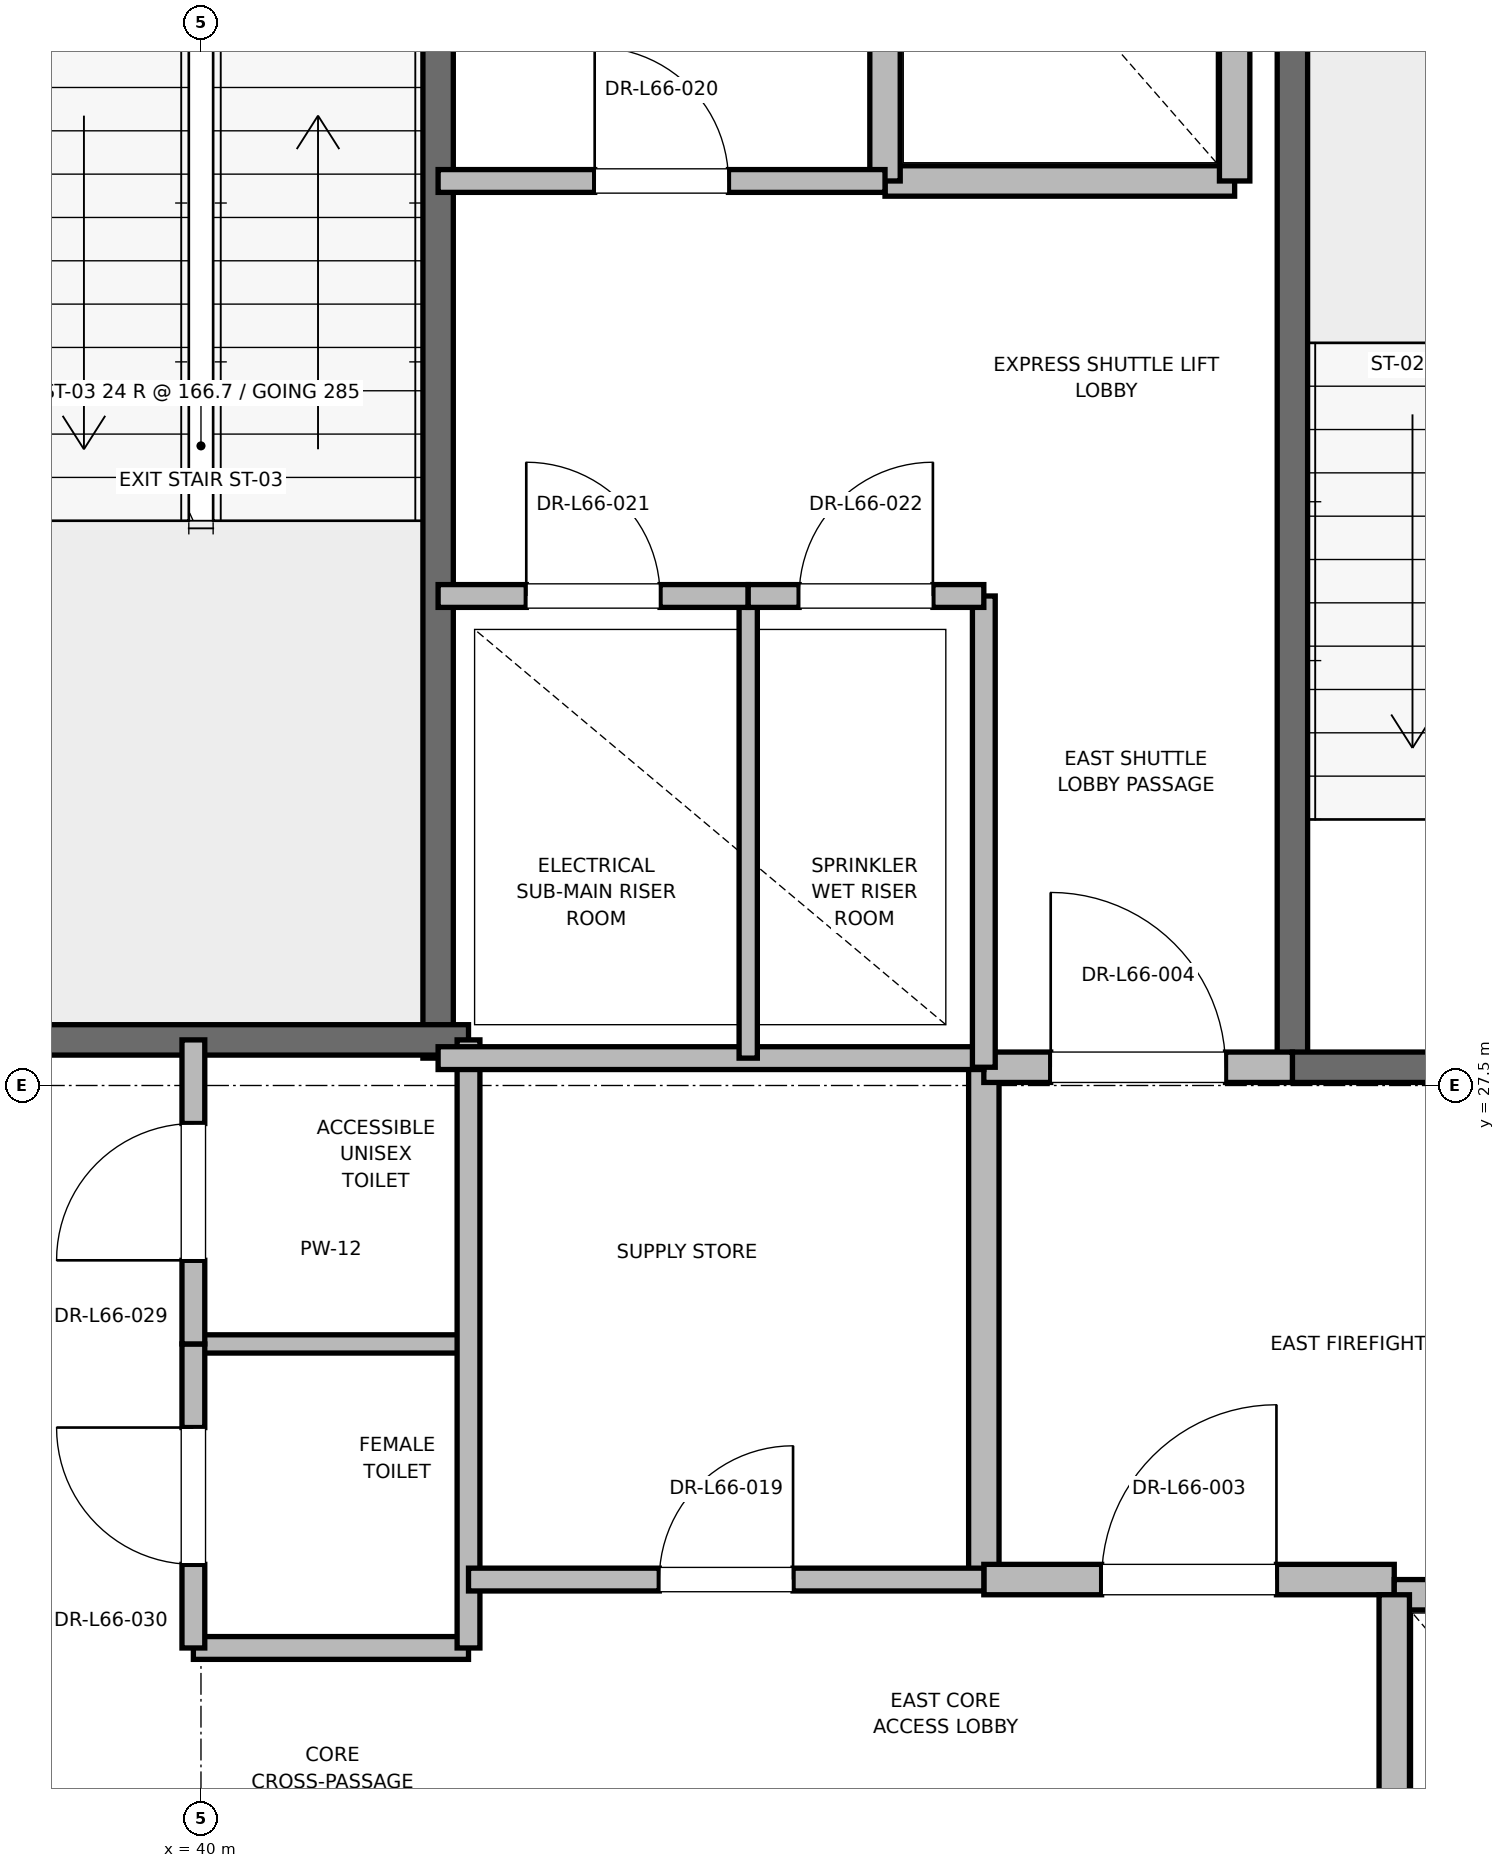
"""IFC4 building model, lengths in metres.
Left out: names, types, materials, properties, quantities, classifications, styles, units other than length and angle.
Written with IfcOpenShell. Run it as: python <this file> out.ifc"""

import sys

from ifc_helpers import new_model, si_unit, direction, frame, frame_2d, origin, place, context, subcontext, project, spatial, rectangle, extrude, element, fill, save


model = new_model("IFC4")
c1 = context("Model", 3, precision=1e-05, world=origin(), true_north=direction((0.0, 1.0)))
c2 = subcontext(c1, "Body", "Model", "MODEL_VIEW")
j1 = project(units=[si_unit("LENGTHUNIT", "METRE"), si_unit("PLANEANGLEUNIT", "RADIAN")], contexts=[c1])
p1 = place(None, origin())
s1 = spatial("IfcSite", under=j1, at=p1, CompositionType="ELEMENT")
p2 = place(p1, origin())
s2 = spatial("IfcBuilding", under=s1, at=p2, CompositionType="ELEMENT")
p3 = place(p2, frame((0.0, 0.0, 283.2)))
s3 = spatial("IfcBuildingStorey", under=s2, at=p3, CompositionType="ELEMENT", Elevation=283.2)
p4 = place(p3, frame((47.18, 27.62, 0.0), z_axis=(0.0, 0.0, 1.0), x_axis=(0.0, 1.0, 0.0)))
e1 = element("IfcWall", 1, at=p4, inside=s3, PredefinedType="SOLIDWALL", context=c2, shape_type="SweptSolid", body=[
    extrude(rectangle(XDim=8.18, YDim=0.2, at=frame_2d((4.09, 0.0))), origin(), (0.0, 0.0, 1.0), 3.785),
])
p5 = place(p3, frame((47.18, 27.62, 0.0), z_axis=(0.0, 0.0, 1.0), x_axis=(1.0, 0.0, 0.0)))
e2 = element("IfcWall", 2, at=p5, inside=s3, PredefinedType="SOLIDWALL", context=c2, shape_type="SweptSolid", body=[
    extrude(rectangle(XDim=3.12, YDim=0.2, at=frame_2d((1.56, 0.0))), origin(), (0.0, 0.0, 1.0), 3.785),
])
p6 = place(p5, frame((1.01, 0.0, 0.0)))
e3 = element("IfcOpeningElement", 3, at=p6, cuts=e2, PredefinedType="OPENING", context=c2, shape_type="SweptSolid", body=[
    extrude(rectangle(XDim=1.1, YDim=2.15, at=frame_2d((0.55, 1.075))), frame((0.0, 0.1, 0.0), z_axis=(0.0, -1.0, 0.0), x_axis=(1.0, 0.0, 0.0)), (0.0, 0.0, 1.0), 0.2),
])
p7 = place(p3, frame((41.56, 27.68, 0.0), z_axis=(0.0, 0.0, 1.0), x_axis=(0.0, 1.0, 0.0)))
e4 = element("IfcWall", 4, at=p7, inside=s3, PredefinedType="SOLIDWALL", context=c2, shape_type="SweptSolid", body=[
    extrude(rectangle(XDim=8.57, YDim=0.2, at=frame_2d((4.285, 0.0))), origin(), (0.0, 0.0, 1.0), 3.785),
])
p8 = place(p3, frame((38.44, 27.8, 0.0), z_axis=(0.0, 0.0, 1.0), x_axis=(1.0, 0.0, 0.0)))
e5 = element("IfcWall", 5, at=p8, inside=s3, PredefinedType="SOLIDWALL", context=c2, shape_type="SweptSolid", body=[
    extrude(rectangle(XDim=3.32, YDim=0.2, at=frame_2d((1.66, 0.0))), origin(), (0.0, 0.0, 1.0), 3.785),
])
p9 = place(p3, frame((45.15, 24.25, 0.0), z_axis=(0.0, 0.0, 1.0), x_axis=(0.0, 1.0, 0.0)))
e6 = element("IfcWall", 6, at=p9, inside=s3, PredefinedType="PARTITIONING", context=c2, shape_type="SweptSolid", body=[
    extrude(rectangle(XDim=3.37, YDim=0.2, at=frame_2d((1.685, 0.0))), origin(), (0.0, 0.0, 1.0), 3.785),
])
p10 = place(p3, frame((45.15, 24.25, 0.0), z_axis=(0.0, 0.0, 1.0), x_axis=(1.0, 0.0, 0.0)))
e7 = element("IfcWall", 7, at=p10, inside=s3, PredefinedType="PARTITIONING", context=c2, shape_type="SweptSolid", body=[
    extrude(rectangle(XDim=2.7, YDim=0.2, at=frame_2d((1.35, 0.0))), origin(), (0.0, 0.0, 1.0), 3.785),
])
p11 = place(p10, frame((0.775, 0.0, 0.0)))
e8 = element("IfcOpeningElement", 8, at=p11, cuts=e7, PredefinedType="OPENING", context=c2, shape_type="SweptSolid", body=[
    extrude(rectangle(XDim=1.15, YDim=2.2, at=frame_2d((0.575, 1.1))), frame((0.0, 0.1, 0.0), z_axis=(0.0, -1.0, 0.0), x_axis=(1.0, 0.0, 0.0)), (0.0, 0.0, 1.0), 0.2),
])
p12 = place(p3, frame((45.15, 27.62, 0.0), z_axis=(0.0, 0.0, 1.0), x_axis=(1.0, 0.0, 0.0)))
e9 = element("IfcWall", 9, at=p12, inside=s3, PredefinedType="PARTITIONING", context=c2, shape_type="SweptSolid", body=[
    extrude(rectangle(XDim=2.03, YDim=0.2, at=frame_2d((1.015, 0.0))), origin(), (0.0, 0.0, 1.0), 3.785),
])
p13 = place(p12, frame((0.44, 0.0, 0.0)))
e10 = element("IfcOpeningElement", 10, at=p13, cuts=e9, PredefinedType="OPENING", context=c2, shape_type="SweptSolid", body=[
    extrude(rectangle(XDim=1.15, YDim=2.2, at=frame_2d((0.575, 1.1))), frame((0.0, 0.1, 0.0), z_axis=(0.0, -1.0, 0.0), x_axis=(1.0, 0.0, 0.0)), (0.0, 0.0, 1.0), 0.2),
])
p14 = place(p3, frame((50.45, 24.15, 0.0), z_axis=(0.0, 0.0, 1.0), x_axis=(-1.0, 0.0, 0.0)))
e11 = element("IfcWall", 11, at=p14, inside=s3, PredefinedType="SOLIDWALL", context=c2, shape_type="SweptSolid", body=[
    extrude(rectangle(XDim=2.6, YDim=0.2, at=frame_2d((1.3, 0.0))), origin(), (0.0, 0.0, 1.0), 2.865),
])
p15 = place(p14, frame((0.75, 0.0, 0.0)))
e12 = element("IfcOpeningElement", 12, at=p15, cuts=e11, PredefinedType="OPENING", context=c2, shape_type="SweptSolid", body=[
    extrude(rectangle(XDim=1.1, YDim=2.2, at=frame_2d((0.55, 1.1))), frame((0.0, 0.1, 0.0), z_axis=(0.0, -1.0, 0.0), x_axis=(1.0, 0.0, 0.0)), (0.0, 0.0, 1.0), 0.2),
])
p16 = place(p3, frame((47.85, 24.15, 0.0), z_axis=(0.0, 0.0, 1.0), x_axis=(0.0, -1.0, 0.0)))
e13 = element("IfcWall", 13, at=p16, inside=s3, PredefinedType="SOLIDWALL", context=c2, shape_type="SweptSolid", body=[
    extrude(rectangle(XDim=3.0, YDim=0.2, at=frame_2d((1.5, 0.0))), origin(), (0.0, 0.0, 1.0), 3.785),
])
p17 = place(p3, frame((44.5, 33.45, 0.0), z_axis=(0.0, 0.0, 1.0), x_axis=(1.0, 0.0, 0.0)))
e14 = element("IfcWall", 14, at=p17, inside=s3, PredefinedType="SOLIDWALL", context=c2, shape_type="SweptSolid", body=[
    extrude(rectangle(XDim=2.3, YDim=0.2, at=frame_2d((1.15, 0.0))), origin(), (0.0, 0.0, 1.0), 3.785),
])
p18 = place(p3, frame((44.5, 36.05, 0.0), z_axis=(0.0, 0.0, 1.0), x_axis=(0.0, -1.0, 0.0)))
e15 = element("IfcWall", 15, at=p18, inside=s3, PredefinedType="SOLIDWALL", context=c2, shape_type="SweptSolid", body=[
    extrude(rectangle(XDim=2.6, YDim=0.2, at=frame_2d((1.3, 0.0))), origin(), (0.0, 0.0, 1.0), 2.865),
])
p19 = place(p3, frame((46.8, 33.45, 0.0), z_axis=(0.0, 0.0, 1.0), x_axis=(0.0, 1.0, 0.0)))
e16 = element("IfcWall", 16, at=p19, inside=s3, PredefinedType="SOLIDWALL", context=c2, shape_type="SweptSolid", body=[
    extrude(rectangle(XDim=2.6, YDim=0.2, at=frame_2d((1.3, 0.0))), origin(), (0.0, 0.0, 1.0), 3.785),
])
p20 = place(p3, frame((39.95, 23.8, 0.0), z_axis=(0.0, 0.0, 1.0), x_axis=(1.0, 0.0, 0.0)))
e17 = element("IfcWall", 17, at=p20, inside=s3, PredefinedType="PARTITIONING", context=c2, shape_type="SweptSolid", body=[
    extrude(rectangle(XDim=1.81, YDim=0.15, at=frame_2d((0.905, 0.0))), origin(), (0.0, 0.0, 1.0), 2.85),
])
p21 = place(p3, frame((39.95, 25.8, 0.0), z_axis=(0.0, 0.0, 1.0), x_axis=(1.0, 0.0, 0.0)))
e18 = element("IfcWall", 18, at=p21, inside=s3, PredefinedType="PARTITIONING", context=c2, shape_type="SweptSolid", body=[
    extrude(rectangle(XDim=1.81, YDim=0.12, at=frame_2d((0.905, 0.0))), origin(), (0.0, 0.0, 1.0), 2.85),
])
p22 = place(p3, frame((41.76, 23.8, 0.0), z_axis=(0.0, 0.0, 1.0), x_axis=(0.0, 1.0, 0.0)))
e19 = element("IfcWall", 19, at=p22, inside=s3, PredefinedType="PARTITIONING", context=c2, shape_type="SweptSolid", body=[
    extrude(rectangle(XDim=4.0, YDim=0.15, at=frame_2d((2.0, 0.0))), origin(), (0.0, 0.0, 1.0), 2.85),
])
p23 = place(p3, frame((39.95, 23.8, 0.0), z_axis=(0.0, 0.0, 1.0), x_axis=(0.0, 1.0, 0.0)))
e20 = element("IfcWall", 20, at=p23, inside=s3, PredefinedType="PARTITIONING", context=c2, shape_type="SweptSolid", body=[
    extrude(rectangle(XDim=2.0, YDim=0.15, at=frame_2d((1.0, 0.0))), origin(), (0.0, 0.0, 1.0), 2.85),
])
p24 = place(p23, frame((0.55, 0.0, 0.0)))
e21 = element("IfcOpeningElement", 21, at=p24, cuts=e20, PredefinedType="OPENING", context=c2, shape_type="SweptSolid", body=[
    extrude(rectangle(XDim=0.9, YDim=2.1, at=frame_2d((0.45, 1.05))), frame((0.0, 0.075, 0.0), z_axis=(0.0, -1.0, 0.0), x_axis=(1.0, 0.0, 0.0)), (0.0, 0.0, 1.0), 0.15),
])
p25 = place(p3, frame((39.95, 25.8, 0.0), z_axis=(0.0, 0.0, 1.0), x_axis=(0.0, 1.0, 0.0)))
e22 = element("IfcWall", 22, at=p25, inside=s3, PredefinedType="PARTITIONING", context=c2, shape_type="SweptSolid", body=[
    extrude(rectangle(XDim=2.0, YDim=0.15, at=frame_2d((1.0, 0.0))), origin(), (0.0, 0.0, 1.0), 2.85),
])
p26 = place(p25, frame((0.55, 0.0, 0.0)))
e23 = element("IfcOpeningElement", 23, at=p26, cuts=e22, PredefinedType="OPENING", context=c2, shape_type="SweptSolid", body=[
    extrude(rectangle(XDim=0.9, YDim=2.1, at=frame_2d((0.45, 1.05))), frame((0.0, 0.075, 0.0), z_axis=(0.0, -1.0, 0.0), x_axis=(1.0, 0.0, 0.0)), (0.0, 0.0, 1.0), 0.15),
])
p27 = place(p3, frame((41.56, 27.68, 0.0), z_axis=(0.0, 0.0, 1.0), x_axis=(1.0, 0.0, 0.0)))
e24 = element("IfcWall", 24, at=p27, inside=s3, PredefinedType="PARTITIONING", context=c2, shape_type="SweptSolid", body=[
    extrude(rectangle(XDim=3.59, YDim=0.15, at=frame_2d((1.795, 0.0))), origin(), (0.0, 0.0, 1.0), 2.85),
])
p28 = place(p3, frame((41.76, 24.25, 0.0), z_axis=(0.0, 0.0, 1.0), x_axis=(1.0, 0.0, 0.0)))
e25 = element("IfcWall", 25, at=p28, inside=s3, PredefinedType="PARTITIONING", context=c2, shape_type="SweptSolid", body=[
    extrude(rectangle(XDim=3.39, YDim=0.15, at=frame_2d((1.695, 0.0))), origin(), (0.0, 0.0, 1.0), 2.85),
])
p29 = place(p28, frame((1.255, 0.0, 0.0)))
e26 = element("IfcOpeningElement", 26, at=p29, cuts=e25, PredefinedType="OPENING", context=c2, shape_type="SweptSolid", body=[
    extrude(rectangle(XDim=0.88, YDim=2.1, at=frame_2d((0.44, 1.05))), frame((0.0, 0.075, 0.0), z_axis=(0.0, -1.0, 0.0), x_axis=(1.0, 0.0, 0.0)), (0.0, 0.0, 1.0), 0.15),
])
p30 = place(p3, frame((45.15, 27.62, 0.0), z_axis=(0.0, 0.0, 1.0), x_axis=(0.0, 1.0, 0.0)))
e27 = element("IfcWall", 27, at=p30, inside=s3, PredefinedType="PARTITIONING", context=c2, shape_type="SweptSolid", body=[
    extrude(rectangle(XDim=3.1, YDim=0.15, at=frame_2d((1.55, 0.0))), origin(), (0.0, 0.0, 1.0), 2.85),
])
p31 = place(p3, frame((43.6, 27.68, 0.0), z_axis=(0.0, 0.0, 1.0), x_axis=(0.0, 1.0, 0.0)))
e28 = element("IfcWall", 28, at=p31, inside=s3, PredefinedType="PARTITIONING", context=c2, shape_type="SweptSolid", body=[
    extrude(rectangle(XDim=3.04, YDim=0.12, at=frame_2d((1.52, 0.0))), origin(), (0.0, 0.0, 1.0), 2.85),
])
p32 = place(p3, frame((41.56, 30.72, 0.0), z_axis=(0.0, 0.0, 1.0), x_axis=(1.0, 0.0, 0.0)))
e29 = element("IfcWall", 29, at=p32, inside=s3, PredefinedType="PARTITIONING", context=c2, shape_type="SweptSolid", body=[
    extrude(rectangle(XDim=2.04, YDim=0.15, at=frame_2d((1.02, 0.0))), origin(), (0.0, 0.0, 1.0), 2.85),
])
p33 = place(p32, frame((0.58, 0.0, 0.0)))
e30 = element("IfcOpeningElement", 30, at=p33, cuts=e29, PredefinedType="OPENING", context=c2, shape_type="SweptSolid", body=[
    extrude(rectangle(XDim=0.88, YDim=2.1, at=frame_2d((0.44, 1.05))), frame((0.0, 0.075, 0.0), z_axis=(0.0, -1.0, 0.0), x_axis=(1.0, 0.0, 0.0)), (0.0, 0.0, 1.0), 0.15),
])
p34 = place(p3, frame((43.6, 30.72, 0.0), z_axis=(0.0, 0.0, 1.0), x_axis=(1.0, 0.0, 0.0)))
e31 = element("IfcWall", 31, at=p34, inside=s3, PredefinedType="PARTITIONING", context=c2, shape_type="SweptSolid", body=[
    extrude(rectangle(XDim=1.55, YDim=0.15, at=frame_2d((0.775, 0.0))), origin(), (0.0, 0.0, 1.0), 2.85),
])
p35 = place(p34, frame((0.335, 0.0, 0.0)))
e32 = element("IfcOpeningElement", 32, at=p35, cuts=e31, PredefinedType="OPENING", context=c2, shape_type="SweptSolid", body=[
    extrude(rectangle(XDim=0.88, YDim=2.1, at=frame_2d((0.44, 1.05))), frame((0.0, 0.075, 0.0), z_axis=(0.0, -1.0, 0.0), x_axis=(1.0, 0.0, 0.0)), (0.0, 0.0, 1.0), 0.15),
])
p36 = place(p3, frame((41.56, 33.45, 0.0), z_axis=(0.0, 0.0, 1.0), x_axis=(1.0, 0.0, 0.0)))
e33 = element("IfcWall", 33, at=p36, inside=s3, PredefinedType="PARTITIONING", context=c2, shape_type="SweptSolid", body=[
    extrude(rectangle(XDim=2.94, YDim=0.15, at=frame_2d((1.47, 0.0))), origin(), (0.0, 0.0, 1.0), 2.85),
])
p37 = place(p36, frame((1.03, 0.0, 0.0)))
e34 = element("IfcOpeningElement", 34, at=p37, cuts=e33, PredefinedType="OPENING", context=c2, shape_type="SweptSolid", body=[
    extrude(rectangle(XDim=0.88, YDim=2.1, at=frame_2d((0.44, 1.05))), frame((0.0, 0.075, 0.0), z_axis=(0.0, -1.0, 0.0), x_axis=(1.0, 0.0, 0.0)), (0.0, 0.0, 1.0), 0.15),
])
p38 = place(p11, origin())
e35 = element("IfcDoor", 35, at=p38, inside=s3, OperationType="SINGLE_SWING_RIGHT", PredefinedType="DOOR", context=c2, shape_type="SweptSolid", body=[
    extrude(rectangle(XDim=1.15, YDim=2.2, at=frame_2d((0.575, 1.1))), frame((0.0, 0.025, 0.0), z_axis=(0.0, -1.0, 0.0), x_axis=(1.0, 0.0, 0.0)), (0.0, 0.0, 1.0), 0.05),
])
fill(e8, e35)
p39 = place(p13, origin())
e36 = element("IfcDoor", 36, at=p39, inside=s3, OperationType="SINGLE_SWING_LEFT", PredefinedType="DOOR", context=c2, shape_type="SweptSolid", body=[
    extrude(rectangle(XDim=1.15, YDim=2.2, at=frame_2d((0.575, 1.1))), frame((0.0, 0.025, 0.0), z_axis=(0.0, -1.0, 0.0), x_axis=(1.0, 0.0, 0.0)), (0.0, 0.0, 1.0), 0.05),
])
fill(e10, e36)
p40 = place(p24, origin())
e37 = element("IfcDoor", 37, at=p40, inside=s3, OperationType="SINGLE_SWING_RIGHT", PredefinedType="DOOR", context=c2, shape_type="SweptSolid", body=[
    extrude(rectangle(XDim=0.9, YDim=2.1, at=frame_2d((0.45, 1.05))), frame((0.0, 0.025, 0.0), z_axis=(0.0, -1.0, 0.0), x_axis=(1.0, 0.0, 0.0)), (0.0, 0.0, 1.0), 0.05),
])
fill(e21, e37)
p41 = place(p26, origin())
e38 = element("IfcDoor", 38, at=p41, inside=s3, OperationType="SINGLE_SWING_LEFT", PredefinedType="DOOR", context=c2, shape_type="SweptSolid", body=[
    extrude(rectangle(XDim=0.9, YDim=2.1, at=frame_2d((0.45, 1.05))), frame((0.0, 0.025, 0.0), z_axis=(0.0, -1.0, 0.0), x_axis=(1.0, 0.0, 0.0)), (0.0, 0.0, 1.0), 0.05),
])
fill(e23, e38)
p42 = place(p29, origin())
e39 = element("IfcDoor", 39, at=p42, inside=s3, OperationType="SINGLE_SWING_RIGHT", PredefinedType="DOOR", context=c2, shape_type="SweptSolid", body=[
    extrude(rectangle(XDim=0.88, YDim=2.1, at=frame_2d((0.44, 1.05))), frame((0.0, 0.025, 0.0), z_axis=(0.0, -1.0, 0.0), x_axis=(1.0, 0.0, 0.0)), (0.0, 0.0, 1.0), 0.05),
])
fill(e26, e39)
p43 = place(p33, origin())
e40 = element("IfcDoor", 40, at=p43, inside=s3, OperationType="SINGLE_SWING_LEFT", PredefinedType="DOOR", context=c2, shape_type="SweptSolid", body=[
    extrude(rectangle(XDim=0.88, YDim=2.1, at=frame_2d((0.44, 1.05))), frame((0.0, 0.025, 0.0), z_axis=(0.0, -1.0, 0.0), x_axis=(1.0, 0.0, 0.0)), (0.0, 0.0, 1.0), 0.05),
])
fill(e30, e40)
p44 = place(p35, origin())
e41 = element("IfcDoor", 41, at=p44, inside=s3, OperationType="SINGLE_SWING_RIGHT", PredefinedType="DOOR", context=c2, shape_type="SweptSolid", body=[
    extrude(rectangle(XDim=0.88, YDim=2.1, at=frame_2d((0.44, 1.05))), frame((0.0, 0.025, 0.0), z_axis=(0.0, -1.0, 0.0), x_axis=(1.0, 0.0, 0.0)), (0.0, 0.0, 1.0), 0.05),
])
fill(e32, e41)
p45 = place(p37, origin())
e42 = element("IfcDoor", 42, at=p45, inside=s3, OperationType="SINGLE_SWING_LEFT", PredefinedType="DOOR", context=c2, shape_type="SweptSolid", body=[
    extrude(rectangle(XDim=0.88, YDim=2.1, at=frame_2d((0.44, 1.05))), frame((0.0, 0.025, 0.0), z_axis=(0.0, -1.0, 0.0), x_axis=(1.0, 0.0, 0.0)), (0.0, 0.0, 1.0), 0.05),
])
fill(e34, e42)
save(model, sys.argv[1])
